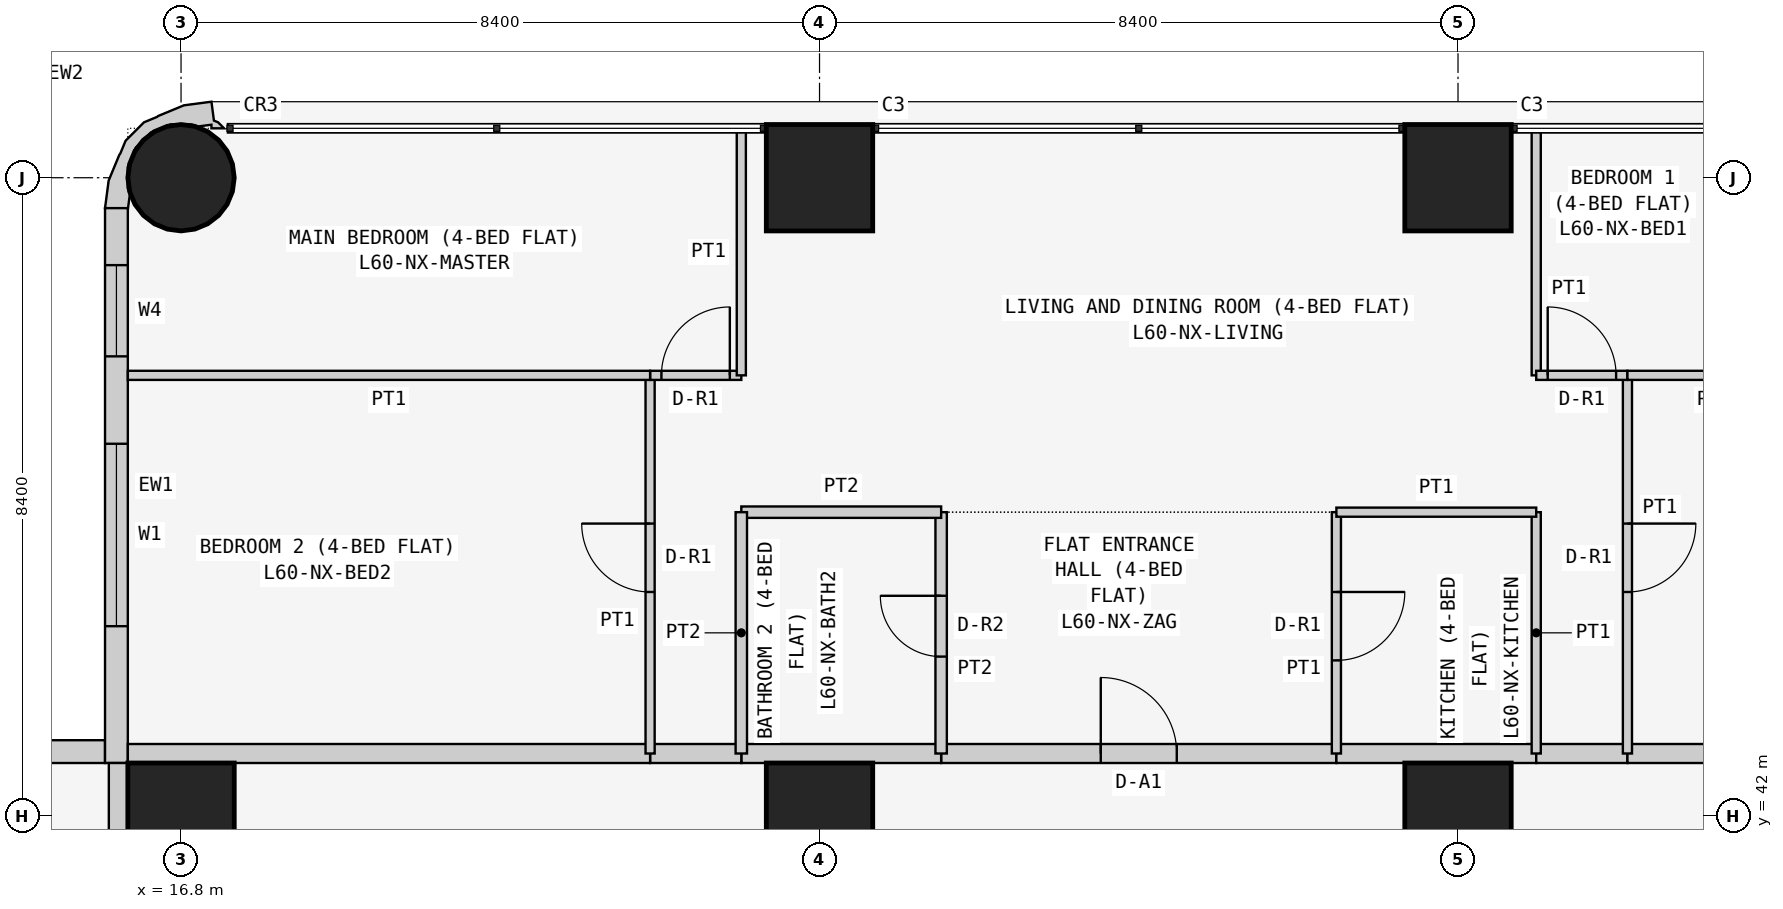
"""IFC4 building model, lengths in metres.
Left out: names, types, materials, properties, quantities, classifications, styles, units other than length and angle.
Written with IfcOpenShell. Run it as: python <this file> out.ifc"""

import sys

from ifc_helpers import new_model, si_unit, direction, frame, frame_2d, origin, origin_2d, place, context, subcontext, project, spatial, polyline, rectangle, circle, outline, extrude, element, fill, save


model = new_model("IFC4")
c1 = context("Model", 3, precision=1e-05, world=origin(), true_north=direction((0.0, 1.0)))
c2 = subcontext(c1, "Body", "Model", "MODEL_VIEW")
j1 = project(units=[si_unit("LENGTHUNIT", "METRE"), si_unit("PLANEANGLEUNIT", "RADIAN")], contexts=[c1])
p1 = place(None, origin())
s1 = spatial("IfcSite", under=j1, at=p1, CompositionType="ELEMENT")
p2 = place(p1, origin())
s2 = spatial("IfcBuilding", under=s1, at=p2, CompositionType="ELEMENT")
p3 = place(p2, frame((0.0, 0.0, 230.1)))
s3 = spatial("IfcBuildingStorey", under=s2, at=p3, CompositionType="ELEMENT", Elevation=230.1)
p4 = place(p3, frame((16.8, 42.0, 0.0), z_axis=(0.0, 0.0, 1.0), x_axis=(1.0, 0.0, 0.0)))
e1 = element("IfcColumn", 1, at=p4, inside=s3, PredefinedType="COLUMN", context=c2, shape_type="SweptSolid", body=[
    extrude(rectangle(XDim=1.4, YDim=1.4, at=origin_2d()), origin(), (0.0, 0.0, 1.0), 3.6),
])
p5 = place(p3, frame((16.8, 50.4, 0.0), z_axis=(0.0, 0.0, 1.0), x_axis=(1.0, 0.0, 0.0)))
e2 = element("IfcColumn", 2, at=p5, inside=s3, PredefinedType="COLUMN", context=c2, shape_type="SweptSolid", body=[
    extrude(circle(Radius=0.7, at=origin_2d()), origin(), (0.0, 0.0, 1.0), 3.6),
])
for number, where, z_axis, x_axis in (
    (3, (25.2, 42.0, 0.0), (0.0, 0.0, 1.0), (1.0, 0.0, 0.0)),
    (4, (25.2, 50.4, 0.0), (0.0, 0.0, 1.0), (1.0, 0.0, 0.0)),
    (5, (33.6, 42.0, 0.0), (0.0, 0.0, 1.0), (1.0, 0.0, 0.0)),
    (6, (33.6, 50.4, 0.0), (0.0, 0.0, 1.0), (1.0, 0.0, 0.0)),
):
    element("IfcColumn", number, at=place(p3, frame(where, z_axis=z_axis, x_axis=x_axis)), inside=s3, PredefinedType="COLUMN", context=c2, shape_type="SweptSolid", body=[
        extrude(rectangle(XDim=1.4, YDim=1.4, at=origin_2d()), origin(), (0.0, 0.0, 1.0), 3.6),
    ])
p6 = place(p3, frame((15.8, 42.85, 0.0), z_axis=(0.0, 0.0, 1.0), x_axis=(-1.0, 0.0, 0.0)))
e7 = element("IfcWall", 7, at=p6, inside=s3, PredefinedType="SOLIDWALL", context=c2, shape_type="SweptSolid", body=[
    extrude(rectangle(XDim=15.4, YDim=0.3, at=frame_2d((7.7, 0.0))), origin(), (0.0, 0.0, 1.0), 3.45),
])
p7 = place(p6, frame((1.2, 0.0, 0.9)))
e8 = element("IfcOpeningElement", 8, at=p7, cuts=e7, PredefinedType="OPENING", context=c2, shape_type="SweptSolid", body=[
    extrude(rectangle(XDim=1.8, YDim=1.5, at=frame_2d((0.9, 0.75))), frame((0.0, 0.16, 0.0), z_axis=(0.0, -1.0, 0.0), x_axis=(1.0, 0.0, 0.0)), (0.0, 0.0, 1.0), 0.32),
])
p8 = place(p6, frame((4.95, 0.0, 1.5)))
e9 = element("IfcOpeningElement", 9, at=p8, cuts=e7, PredefinedType="OPENING", context=c2, shape_type="SweptSolid", body=[
    extrude(rectangle(XDim=0.9, YDim=0.7, at=frame_2d((0.45, 0.35))), frame((0.0, 0.16, 0.0), z_axis=(0.0, -1.0, 0.0), x_axis=(1.0, 0.0, 0.0)), (0.0, 0.0, 1.0), 0.32),
])
p9 = place(p6, frame((8.5, 0.0, 0.9)))
e10 = element("IfcOpeningElement", 10, at=p9, cuts=e7, PredefinedType="OPENING", context=c2, shape_type="SweptSolid", body=[
    extrude(rectangle(XDim=1.8, YDim=1.5, at=frame_2d((0.9, 0.75))), frame((0.0, 0.16, 0.0), z_axis=(0.0, -1.0, 0.0), x_axis=(1.0, 0.0, 0.0)), (0.0, 0.0, 1.0), 0.32),
])
p10 = place(p6, frame((12.5, 0.0, 0.0)))
e11 = element("IfcOpeningElement", 11, at=p10, cuts=e7, PredefinedType="OPENING", context=c2, shape_type="SweptSolid", body=[
    extrude(rectangle(XDim=0.9, YDim=2.4, at=frame_2d((0.45, 1.2))), frame((0.0, 0.16, 0.0), z_axis=(0.0, -1.0, 0.0), x_axis=(1.0, 0.0, 0.0)), (0.0, 0.0, 1.0), 0.32),
])
p11 = place(p6, frame((13.5, 0.0, 0.9)))
e12 = element("IfcOpeningElement", 12, at=p11, cuts=e7, PredefinedType="OPENING", context=c2, shape_type="SweptSolid", body=[
    extrude(rectangle(XDim=1.2, YDim=1.5, at=frame_2d((0.6, 0.75))), frame((0.0, 0.16, 0.0), z_axis=(0.0, -1.0, 0.0), x_axis=(1.0, 0.0, 0.0)), (0.0, 0.0, 1.0), 0.32),
])
p12 = place(p3, frame((15.95, 50.0, 0.0), z_axis=(0.0, 0.0, 1.0), x_axis=(0.0, -1.0, 0.0)))
e13 = element("IfcWall", 13, at=p12, inside=s3, PredefinedType="SOLIDWALL", context=c2, shape_type="SweptSolid", body=[
    extrude(rectangle(XDim=7.3, YDim=0.3, at=frame_2d((3.65, 0.0))), origin(), (0.0, 0.0, 1.0), 3.45),
])
p13 = place(p12, frame((3.1, 0.0, 0.9)))
e14 = element("IfcOpeningElement", 14, at=p13, cuts=e13, PredefinedType="OPENING", context=c2, shape_type="SweptSolid", body=[
    extrude(rectangle(XDim=2.4, YDim=1.5, at=frame_2d((1.2, 0.75))), frame((0.0, 0.16, 0.0), z_axis=(0.0, -1.0, 0.0), x_axis=(1.0, 0.0, 0.0)), (0.0, 0.0, 1.0), 0.32),
])
p14 = place(p12, frame((0.75, 0.0, 0.9)))
e15 = element("IfcOpeningElement", 15, at=p14, cuts=e13, PredefinedType="OPENING", context=c2, shape_type="SweptSolid", body=[
    extrude(rectangle(XDim=1.2, YDim=1.5, at=frame_2d((0.6, 0.75))), frame((0.0, 0.16, 0.0), z_axis=(0.0, -1.0, 0.0), x_axis=(1.0, 0.0, 0.0)), (0.0, 0.0, 1.0), 0.32),
])
p15 = place(p3, frame((17.312, 50.988, 0.0), z_axis=(0.0, 0.0, 1.0), x_axis=(-0.439933741929, 0.898030234854, 0.0)))
e16 = element("IfcWall", 16, at=p15, inside=s3, PredefinedType="SOLIDWALL", context=c2, shape_type="SweptSolid", body=[
    extrude(outline(polyline([(0.138, -0.039), (0.182, -0.0), (0.419, -0.08), (0.536, 0.266), (0.559, 0.631), (0.555, 0.651), (0.566, 0.836), (0.456, 1.159), (0.333, 1.298), (0.324, 1.316), (0.082, 1.591), (-0.222, 1.793), (-0.39, 1.541), (-0.372, 1.532), (-0.195, 1.414), (-0.12, 1.41), (0.131, 1.287), (0.315, 1.078), (0.406, 0.814), (0.388, 0.536), (0.265, 0.285), (0.209, 0.236), (0.148, 0.053), (0.105, 0.074), (0.032, -0.076), (0.138, -0.039)])), origin(), (0.0, 0.0, 1.0), 3.45),
])
p16 = place(p3, frame((26.8, 42.825, 0.0), z_axis=(0.0, 0.0, 1.0), x_axis=(1.0, 0.0, 0.0)))
e17 = element("IfcWall", 17, at=p16, inside=s3, PredefinedType="PARTITIONING", context=c2, shape_type="SweptSolid", body=[
    extrude(rectangle(XDim=5.2, YDim=0.25, at=frame_2d((2.6, 0.0))), origin(), (0.0, 0.0, 1.0), 3.45),
])
p17 = place(p16, frame((2.1, 0.0, 0.0)))
e18 = element("IfcOpeningElement", 18, at=p17, cuts=e17, PredefinedType="OPENING", context=c2, shape_type="SweptSolid", body=[
    extrude(rectangle(XDim=1.0, YDim=2.1, at=frame_2d((0.5, 1.05))), frame((0.0, 0.135, 0.0), z_axis=(0.0, -1.0, 0.0), x_axis=(1.0, 0.0, 0.0)), (0.0, 0.0, 1.0), 0.27),
])
p18 = place(p3, frame((24.171, 42.825, 0.0), z_axis=(0.0, 0.0, 1.0), x_axis=(1.0, 0.0, 0.0)))
e19 = element("IfcWall", 19, at=p18, inside=s3, PredefinedType="PARTITIONING", context=c2, shape_type="SweptSolid", body=[
    extrude(rectangle(XDim=2.629, YDim=0.25, at=frame_2d((1.314, 0.0))), origin(), (0.0, 0.0, 1.0), 3.45),
])
p19 = place(p3, frame((32.0, 42.825, 0.0), z_axis=(0.0, 0.0, 1.0), x_axis=(1.0, 0.0, 0.0)))
e20 = element("IfcWall", 20, at=p19, inside=s3, PredefinedType="PARTITIONING", context=c2, shape_type="SweptSolid", body=[
    extrude(rectangle(XDim=2.629, YDim=0.25, at=frame_2d((1.314, 0.0))), origin(), (0.0, 0.0, 1.0), 3.45),
])
p20 = place(p3, frame((22.971, 42.825, 0.0), z_axis=(0.0, 0.0, 1.0), x_axis=(1.0, 0.0, 0.0)))
e21 = element("IfcWall", 21, at=p20, inside=s3, PredefinedType="PARTITIONING", context=c2, shape_type="SweptSolid", body=[
    extrude(rectangle(XDim=1.2, YDim=0.25, at=frame_2d((0.6, 0.0))), origin(), (0.0, 0.0, 1.0), 3.45),
])
p21 = place(p3, frame((34.629, 42.825, 0.0), z_axis=(0.0, 0.0, 1.0), x_axis=(1.0, 0.0, 0.0)))
e22 = element("IfcWall", 22, at=p21, inside=s3, PredefinedType="PARTITIONING", context=c2, shape_type="SweptSolid", body=[
    extrude(rectangle(XDim=1.2, YDim=0.25, at=frame_2d((0.6, 0.0))), origin(), (0.0, 0.0, 1.0), 3.45),
])
for number, where, z_axis, x_axis in (
    (23, (16.1, 42.825, 0.0), (0.0, 0.0, 1.0), (1.0, 0.0, 0.0)),
    (24, (35.829, 42.825, 0.0), (0.0, 0.0, 1.0), (1.0, 0.0, 0.0)),
    (25, (15.975, 35.829, 0.0), (0.0, 0.0, 1.0), (0.0, 1.0, 0.0)),
):
    element("IfcWall", number, at=place(p3, frame(where, z_axis=z_axis, x_axis=x_axis)), inside=s3, PredefinedType="PARTITIONING", context=c2, shape_type="SweptSolid", body=[
        extrude(rectangle(XDim=6.871, YDim=0.25, at=frame_2d((3.436, 0.0))), origin(), (0.0, 0.0, 1.0), 3.45),
    ])
p22 = place(p3, frame((26.8, 46.0, 0.0), z_axis=(0.0, 0.0, 1.0), x_axis=(0.0, -1.0, 0.0)))
e26 = element("IfcWall", 26, at=p22, inside=s3, PredefinedType="PARTITIONING", context=c2, shape_type="SweptSolid", body=[
    extrude(rectangle(XDim=3.175, YDim=0.15, at=frame_2d((1.587, 0.0))), origin(), (0.0, 0.0, 1.0), 3.45),
])
p23 = place(p22, frame((1.1, 0.0, 0.0)))
e27 = element("IfcOpeningElement", 27, at=p23, cuts=e26, PredefinedType="OPENING", context=c2, shape_type="SweptSolid", body=[
    extrude(rectangle(XDim=0.8, YDim=2.1, at=frame_2d((0.4, 1.05))), frame((0.0, 0.085, 0.0), z_axis=(0.0, -1.0, 0.0), x_axis=(1.0, 0.0, 0.0)), (0.0, 0.0, 1.0), 0.17),
])
p24 = place(p3, frame((32.0, 42.825, 0.0), z_axis=(0.0, 0.0, 1.0), x_axis=(0.0, 1.0, 0.0)))
e28 = element("IfcWall", 28, at=p24, inside=s3, PredefinedType="PARTITIONING", context=c2, shape_type="SweptSolid", body=[
    extrude(rectangle(XDim=3.175, YDim=0.12, at=frame_2d((1.587, 0.0))), origin(), (0.0, 0.0, 1.0), 3.45),
])
p25 = place(p24, frame((1.225, 0.0, 0.0)))
e29 = element("IfcOpeningElement", 29, at=p25, cuts=e28, PredefinedType="OPENING", context=c2, shape_type="SweptSolid", body=[
    extrude(rectangle(XDim=0.9, YDim=2.1, at=frame_2d((0.45, 1.05))), frame((0.0, 0.07, 0.0), z_axis=(0.0, -1.0, 0.0), x_axis=(1.0, 0.0, 0.0)), (0.0, 0.0, 1.0), 0.14),
])
p26 = place(p3, frame((26.8, 46.0, 0.0), z_axis=(0.0, 0.0, 1.0), x_axis=(-1.0, 0.0, 0.0)))
e30 = element("IfcWall", 30, at=p26, inside=s3, PredefinedType="PARTITIONING", context=c2, shape_type="SweptSolid", body=[
    extrude(rectangle(XDim=2.629, YDim=0.15, at=frame_2d((1.314, 0.0))), origin(), (0.0, 0.0, 1.0), 3.45),
])
p27 = place(p3, frame((24.171, 46.0, 0.0), z_axis=(0.0, 0.0, 1.0), x_axis=(0.0, -1.0, 0.0)))
e31 = element("IfcWall", 31, at=p27, inside=s3, PredefinedType="PARTITIONING", context=c2, shape_type="SweptSolid", body=[
    extrude(rectangle(XDim=3.175, YDim=0.15, at=frame_2d((1.587, 0.0))), origin(), (0.0, 0.0, 1.0), 3.45),
])
p28 = place(p3, frame((34.629, 42.825, 0.0), z_axis=(0.0, 0.0, 1.0), x_axis=(0.0, 1.0, 0.0)))
e32 = element("IfcWall", 32, at=p28, inside=s3, PredefinedType="PARTITIONING", context=c2, shape_type="SweptSolid", body=[
    extrude(rectangle(XDim=3.175, YDim=0.12, at=frame_2d((1.587, 0.0))), origin(), (0.0, 0.0, 1.0), 3.45),
])
p29 = place(p3, frame((34.629, 46.0, 0.0), z_axis=(0.0, 0.0, 1.0), x_axis=(-1.0, 0.0, 0.0)))
e33 = element("IfcWall", 33, at=p29, inside=s3, PredefinedType="PARTITIONING", context=c2, shape_type="SweptSolid", body=[
    extrude(rectangle(XDim=2.629, YDim=0.12, at=frame_2d((1.314, 0.0))), origin(), (0.0, 0.0, 1.0), 3.45),
])
p30 = place(p3, frame((22.971, 42.825, 0.0), z_axis=(0.0, 0.0, 1.0), x_axis=(0.0, 1.0, 0.0)))
e34 = element("IfcWall", 34, at=p30, inside=s3, PredefinedType="PARTITIONING", context=c2, shape_type="SweptSolid", body=[
    extrude(rectangle(XDim=4.975, YDim=0.12, at=frame_2d((2.488, 0.0))), origin(), (0.0, 0.0, 1.0), 3.45),
])
p31 = place(p30, frame((2.125, 0.0, 0.0)))
e35 = element("IfcOpeningElement", 35, at=p31, cuts=e34, PredefinedType="OPENING", context=c2, shape_type="SweptSolid", body=[
    extrude(rectangle(XDim=0.9, YDim=2.1, at=frame_2d((0.45, 1.05))), frame((0.0, 0.07, 0.0), z_axis=(0.0, -1.0, 0.0), x_axis=(1.0, 0.0, 0.0)), (0.0, 0.0, 1.0), 0.14),
])
p32 = place(p3, frame((22.971, 47.8, 0.0), z_axis=(0.0, 0.0, 1.0), x_axis=(1.0, 0.0, 0.0)))
e36 = element("IfcWall", 36, at=p32, inside=s3, PredefinedType="PARTITIONING", context=c2, shape_type="SweptSolid", body=[
    extrude(rectangle(XDim=1.2, YDim=0.12, at=frame_2d((0.6, 0.0))), origin(), (0.0, 0.0, 1.0), 3.45),
])
p33 = place(p32, frame((0.149, 0.0, 0.0)))
e37 = element("IfcOpeningElement", 37, at=p33, cuts=e36, PredefinedType="OPENING", context=c2, shape_type="SweptSolid", body=[
    extrude(rectangle(XDim=0.9, YDim=2.1, at=frame_2d((0.45, 1.05))), frame((0.0, 0.07, 0.0), z_axis=(0.0, -1.0, 0.0), x_axis=(1.0, 0.0, 0.0)), (0.0, 0.0, 1.0), 0.14),
])
p34 = place(p3, frame((24.171, 47.8, 0.0), z_axis=(0.0, 0.0, 1.0), x_axis=(0.0, 1.0, 0.0)))
e38 = element("IfcWall", 38, at=p34, inside=s3, PredefinedType="PARTITIONING", context=c2, shape_type="SweptSolid", body=[
    extrude(rectangle(XDim=3.25, YDim=0.12, at=frame_2d((1.625, 0.0))), origin(), (0.0, 0.0, 1.0), 3.45),
])
p35 = place(p3, frame((35.829, 47.8, 0.0), z_axis=(0.0, 0.0, 1.0), x_axis=(0.0, -1.0, 0.0)))
e39 = element("IfcWall", 39, at=p35, inside=s3, PredefinedType="PARTITIONING", context=c2, shape_type="SweptSolid", body=[
    extrude(rectangle(XDim=4.975, YDim=0.12, at=frame_2d((2.488, 0.0))), origin(), (0.0, 0.0, 1.0), 3.45),
])
p36 = place(p35, frame((1.95, 0.0, 0.0)))
e40 = element("IfcOpeningElement", 40, at=p36, cuts=e39, PredefinedType="OPENING", context=c2, shape_type="SweptSolid", body=[
    extrude(rectangle(XDim=0.9, YDim=2.1, at=frame_2d((0.45, 1.05))), frame((0.0, 0.07, 0.0), z_axis=(0.0, -1.0, 0.0), x_axis=(1.0, 0.0, 0.0)), (0.0, 0.0, 1.0), 0.14),
])
p37 = place(p3, frame((34.629, 51.05, 0.0), z_axis=(0.0, 0.0, 1.0), x_axis=(0.0, -1.0, 0.0)))
e41 = element("IfcWall", 41, at=p37, inside=s3, PredefinedType="PARTITIONING", context=c2, shape_type="SweptSolid", body=[
    extrude(rectangle(XDim=3.25, YDim=0.12, at=frame_2d((1.625, 0.0))), origin(), (0.0, 0.0, 1.0), 3.45),
])
p38 = place(p3, frame((34.629, 47.8, 0.0), z_axis=(0.0, 0.0, 1.0), x_axis=(1.0, 0.0, 0.0)))
e42 = element("IfcWall", 42, at=p38, inside=s3, PredefinedType="PARTITIONING", context=c2, shape_type="SweptSolid", body=[
    extrude(rectangle(XDim=1.2, YDim=0.12, at=frame_2d((0.6, 0.0))), origin(), (0.0, 0.0, 1.0), 3.45),
])
p39 = place(p38, frame((0.151, 0.0, 0.0)))
e43 = element("IfcOpeningElement", 43, at=p39, cuts=e42, PredefinedType="OPENING", context=c2, shape_type="SweptSolid", body=[
    extrude(rectangle(XDim=0.9, YDim=2.1, at=frame_2d((0.45, 1.05))), frame((0.0, 0.07, 0.0), z_axis=(0.0, -1.0, 0.0), x_axis=(1.0, 0.0, 0.0)), (0.0, 0.0, 1.0), 0.14),
])
p40 = place(p3, frame((22.971, 47.8, 0.0), z_axis=(0.0, 0.0, 1.0), x_axis=(-1.0, 0.0, 0.0)))
e44 = element("IfcWall", 44, at=p40, inside=s3, PredefinedType="PARTITIONING", context=c2, shape_type="SweptSolid", body=[
    extrude(rectangle(XDim=6.871, YDim=0.12, at=frame_2d((3.436, 0.0))), origin(), (0.0, 0.0, 1.0), 3.45),
])
p41 = place(p3, frame((38.114, 47.8, 0.0), z_axis=(0.0, 0.0, 1.0), x_axis=(-1.0, 0.0, 0.0)))
e45 = element("IfcWall", 45, at=p41, inside=s3, PredefinedType="PARTITIONING", context=c2, shape_type="SweptSolid", body=[
    extrude(rectangle(XDim=2.285, YDim=0.12, at=frame_2d((1.143, 0.0))), origin(), (0.0, 0.0, 1.0), 3.45),
])
p42 = place(p13, origin())
e46 = element("IfcWindow", 46, at=p42, inside=s3, PartitioningType="SINGLE_PANEL", PredefinedType="WINDOW", context=c2, shape_type="SweptSolid", body=[
    extrude(rectangle(XDim=2.4, YDim=1.5, at=frame_2d((1.2, 0.75))), frame((0.0, 0.03, 0.0), z_axis=(0.0, -1.0, 0.0), x_axis=(1.0, 0.0, 0.0)), (0.0, 0.0, 1.0), 0.06),
])
fill(e14, e46)
p43 = place(p14, origin())
e47 = element("IfcWindow", 47, at=p43, inside=s3, PartitioningType="SINGLE_PANEL", PredefinedType="WINDOW", context=c2, shape_type="SweptSolid", body=[
    extrude(rectangle(XDim=1.2, YDim=1.5, at=frame_2d((0.6, 0.75))), frame((0.0, 0.03, 0.0), z_axis=(0.0, -1.0, 0.0), x_axis=(1.0, 0.0, 0.0)), (0.0, 0.0, 1.0), 0.06),
])
fill(e15, e47)
p44 = place(p17, origin())
e48 = element("IfcDoor", 48, at=p44, inside=s3, OperationType="SINGLE_SWING_LEFT", PredefinedType="DOOR", context=c2, shape_type="SweptSolid", body=[
    extrude(rectangle(XDim=1.0, YDim=2.1, at=frame_2d((0.5, 1.05))), frame((0.0, 0.025, 0.0), z_axis=(0.0, -1.0, 0.0), x_axis=(1.0, 0.0, 0.0)), (0.0, 0.0, 1.0), 0.05),
])
fill(e18, e48)
p45 = place(p23, frame((0.8, 0.0, 0.0), z_axis=(0.0, 0.0, 1.0), x_axis=(-1.0, 0.0, 0.0)))
e49 = element("IfcDoor", 49, at=p45, inside=s3, OperationType="SINGLE_SWING_RIGHT", PredefinedType="DOOR", context=c2, shape_type="SweptSolid", body=[
    extrude(rectangle(XDim=0.8, YDim=2.1, at=frame_2d((0.4, 1.05))), frame((0.0, 0.025, 0.0), z_axis=(0.0, -1.0, 0.0), x_axis=(1.0, 0.0, 0.0)), (0.0, 0.0, 1.0), 0.05),
])
fill(e27, e49)
p46 = place(p25, frame((0.9, 0.0, 0.0), z_axis=(0.0, 0.0, 1.0), x_axis=(-1.0, 0.0, 0.0)))
e50 = element("IfcDoor", 50, at=p46, inside=s3, OperationType="SINGLE_SWING_LEFT", PredefinedType="DOOR", context=c2, shape_type="SweptSolid", body=[
    extrude(rectangle(XDim=0.9, YDim=2.1, at=frame_2d((0.45, 1.05))), frame((0.0, 0.025, 0.0), z_axis=(0.0, -1.0, 0.0), x_axis=(1.0, 0.0, 0.0)), (0.0, 0.0, 1.0), 0.05),
])
fill(e29, e50)
p47 = place(p31, origin())
e51 = element("IfcDoor", 51, at=p47, inside=s3, OperationType="SINGLE_SWING_RIGHT", PredefinedType="DOOR", context=c2, shape_type="SweptSolid", body=[
    extrude(rectangle(XDim=0.9, YDim=2.1, at=frame_2d((0.45, 1.05))), frame((0.0, 0.025, 0.0), z_axis=(0.0, -1.0, 0.0), x_axis=(1.0, 0.0, 0.0)), (0.0, 0.0, 1.0), 0.05),
])
fill(e35, e51)
p48 = place(p33, origin())
e52 = element("IfcDoor", 52, at=p48, inside=s3, OperationType="SINGLE_SWING_RIGHT", PredefinedType="DOOR", context=c2, shape_type="SweptSolid", body=[
    extrude(rectangle(XDim=0.9, YDim=2.1, at=frame_2d((0.45, 1.05))), frame((0.0, 0.025, 0.0), z_axis=(0.0, -1.0, 0.0), x_axis=(1.0, 0.0, 0.0)), (0.0, 0.0, 1.0), 0.05),
])
fill(e37, e52)
p49 = place(p36, origin())
e53 = element("IfcDoor", 53, at=p49, inside=s3, OperationType="SINGLE_SWING_LEFT", PredefinedType="DOOR", context=c2, shape_type="SweptSolid", body=[
    extrude(rectangle(XDim=0.9, YDim=2.1, at=frame_2d((0.45, 1.05))), frame((0.0, 0.025, 0.0), z_axis=(0.0, -1.0, 0.0), x_axis=(1.0, 0.0, 0.0)), (0.0, 0.0, 1.0), 0.05),
])
fill(e40, e53)
p50 = place(p39, origin())
e54 = element("IfcDoor", 54, at=p50, inside=s3, OperationType="SINGLE_SWING_LEFT", PredefinedType="DOOR", context=c2, shape_type="SweptSolid", body=[
    extrude(rectangle(XDim=0.9, YDim=2.1, at=frame_2d((0.45, 1.05))), frame((0.0, 0.025, 0.0), z_axis=(0.0, -1.0, 0.0), x_axis=(1.0, 0.0, 0.0)), (0.0, 0.0, 1.0), 0.05),
])
fill(e43, e54)
save(model, sys.argv[1])
